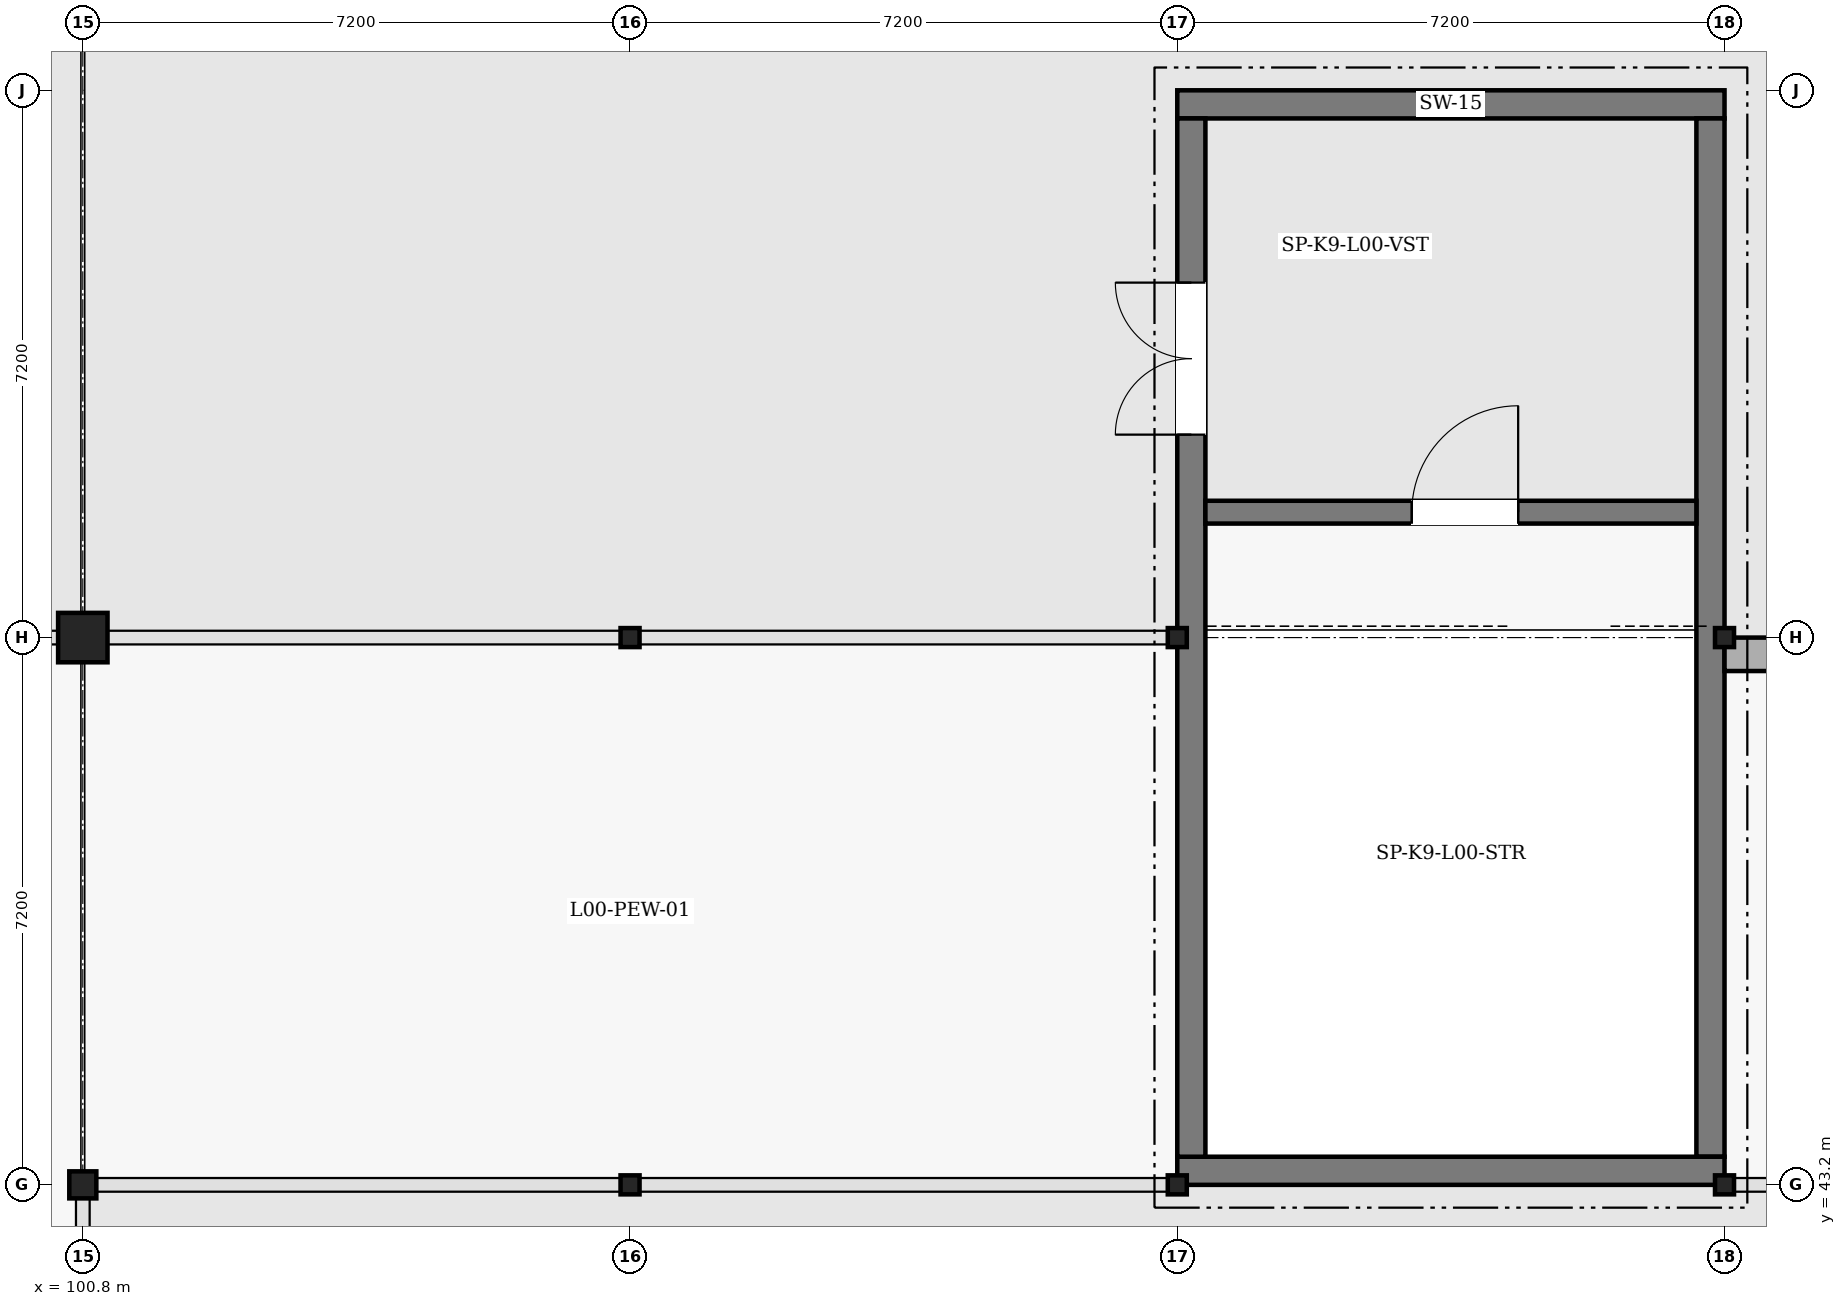
"""IFC4 building model, lengths in metres.
Left out: names, types, materials, properties, quantities, classifications, styles, units other than length and angle.
Written with IfcOpenShell. Run it as: python <this file> out.ifc"""

import sys

from ifc_helpers import new_model, si_unit, direction, frame, frame_2d, origin, origin_2d, place, context, subcontext, project, spatial, rectangle, hollow_rectangle, hollow_circle, extrude, element, fill, save


model = new_model("IFC4")
c1 = context("Model", 3, precision=1e-05, world=origin(), true_north=direction((0.0, 1.0)))
c2 = subcontext(c1, "Body", "Model", "MODEL_VIEW")
j1 = project(units=[si_unit("LENGTHUNIT", "METRE"), si_unit("PLANEANGLEUNIT", "RADIAN")], contexts=[c1])
p1 = place(None, origin())
s1 = spatial("IfcSite", under=j1, at=p1, CompositionType="ELEMENT")
p2 = place(p1, origin())
s2 = spatial("IfcBuilding", under=s1, at=p2, CompositionType="ELEMENT")
p3 = place(p2, origin())
s3 = spatial("IfcBuildingStorey", under=s2, at=p3, CompositionType="ELEMENT", Elevation=0.0)
p4 = place(p3, frame((115.2, 57.415, 0.0), z_axis=(0.0, 0.0, 1.0), x_axis=(1.0, 0.0, 0.0)))
e1 = element("IfcWall", 1, at=p4, inside=s3, PredefinedType="SHEAR", context=c2, shape_type="SweptSolid", body=[
    extrude(rectangle(XDim=7.2, YDim=0.37, at=frame_2d((3.6, 0.0))), origin(), (0.0, 0.0, 1.0), 5.4),
])
p5 = place(p3, frame((122.215, 57.23, 0.0), z_axis=(0.0, 0.0, 1.0), x_axis=(0.0, -1.0, 0.0)))
e2 = element("IfcWall", 2, at=p5, inside=s3, PredefinedType="SHEAR", context=c2, shape_type="SweptSolid", body=[
    extrude(rectangle(XDim=13.66, YDim=0.37, at=frame_2d((6.83, 0.0))), origin(), (0.0, 0.0, 1.0), 5.4),
])
p6 = place(p3, frame((122.4, 43.385, 0.0), z_axis=(0.0, 0.0, 1.0), x_axis=(-1.0, 0.0, 0.0)))
e3 = element("IfcWall", 3, at=p6, inside=s3, PredefinedType="SHEAR", context=c2, shape_type="SweptSolid", body=[
    extrude(rectangle(XDim=7.2, YDim=0.37, at=frame_2d((3.6, 0.0))), origin(), (0.0, 0.0, 1.0), 5.4),
])
p7 = place(p3, frame((115.385, 43.57, 0.0), z_axis=(0.0, 0.0, 1.0), x_axis=(0.0, 1.0, 0.0)))
e4 = element("IfcWall", 4, at=p7, inside=s3, PredefinedType="SHEAR", context=c2, shape_type="SweptSolid", body=[
    extrude(rectangle(XDim=13.66, YDim=0.37, at=frame_2d((6.83, 0.0))), origin(), (0.0, 0.0, 1.0), 5.4),
])
p8 = place(p7, frame((9.5, 0.0, 0.0)))
e5 = element("IfcOpeningElement", 5, at=p8, cuts=e4, PredefinedType="OPENING", context=c2, shape_type="SweptSolid", body=[
    extrude(rectangle(XDim=2.0, YDim=2.3, at=frame_2d((1.0, 1.15))), frame((0.0, 0.195, 0.0), z_axis=(0.0, -1.0, 0.0), x_axis=(1.0, 0.0, 0.0)), (0.0, 0.0, 1.0), 0.39),
])
p9 = place(p3, frame((115.57, 52.05, 0.0), z_axis=(0.0, 0.0, 1.0), x_axis=(1.0, 0.0, 0.0)))
e6 = element("IfcWall", 6, at=p9, inside=s3, PredefinedType="SHEAR", context=c2, shape_type="SweptSolid", body=[
    extrude(rectangle(XDim=6.46, YDim=0.3, at=frame_2d((3.23, 0.0))), origin(), (0.0, 0.0, 1.0), 5.4),
])
p10 = place(p9, frame((2.715, 0.0, 0.0)))
e7 = element("IfcOpeningElement", 7, at=p10, cuts=e6, PredefinedType="OPENING", context=c2, shape_type="SweptSolid", body=[
    extrude(rectangle(XDim=1.4, YDim=2.2, at=frame_2d((0.7, 1.1))), frame((0.0, 0.16, 0.0), z_axis=(0.0, -1.0, 0.0), x_axis=(1.0, 0.0, 0.0)), (0.0, 0.0, 1.0), 0.32),
])
p11 = place(p3, frame((100.8, 43.2, 0.0), z_axis=(0.0, 0.0, 1.0), x_axis=(1.0, 0.0, 0.0)))
e8 = element("IfcColumn", 8, at=p11, inside=s3, PredefinedType="COLUMN", context=c2, shape_type="SweptSolid", body=[
    extrude(hollow_circle(Radius=0.178, WallThickness=0.016, at=origin_2d()), origin(), (0.0, 0.0, 1.0), 5.1),
])
p12 = place(p3, frame((100.8, 50.4, 0.0), z_axis=(0.0, 0.0, 1.0), x_axis=(1.0, 0.0, 0.0)))
e9 = element("IfcColumn", 9, at=p12, inside=s3, PredefinedType="COLUMN", context=c2, shape_type="SweptSolid", body=[
    extrude(rectangle(XDim=0.65, YDim=0.65, at=origin_2d()), origin(), (0.0, 0.0, 1.0), 5.4),
])
for number, where, z_axis, x_axis in (
    (10, (108.0, 43.2, 0.0), (0.0, 0.0, 1.0), (1.0, 0.0, 0.0)),
    (11, (108.0, 50.4, 0.0), (0.0, 0.0, 1.0), (1.0, 0.0, 0.0)),
    (12, (115.2, 43.2, 0.0), (0.0, 0.0, 1.0), (1.0, 0.0, 0.0)),
    (13, (115.2, 50.4, 0.0), (0.0, 0.0, 1.0), (1.0, 0.0, 0.0)),
    (14, (122.4, 43.2, 0.0), (0.0, 0.0, 1.0), (1.0, 0.0, 0.0)),
    (15, (122.4, 50.4, 0.0), (0.0, 0.0, 1.0), (1.0, 0.0, 0.0)),
):
    element("IfcColumn", number, at=place(p3, frame(where, z_axis=z_axis, x_axis=x_axis)), inside=s3, PredefinedType="COLUMN", context=c2, shape_type="SweptSolid", body=[
        extrude(hollow_rectangle(XDim=0.25, YDim=0.25, WallThickness=0.012, at=origin_2d()), origin(), (0.0, 0.0, 1.0), 5.16),
    ])
p13 = place(p3, frame((122.4, 50.18, 0.0), z_axis=(0.0, 0.0, 1.0), x_axis=(1.0, 0.0, 0.0)))
e16 = element("IfcWall", 16, at=p13, inside=s3, PredefinedType="SOLIDWALL", context=c2, shape_type="SweptSolid", body=[
    extrude(rectangle(XDim=7.315, YDim=0.44, at=frame_2d((3.658, 0.0))), origin(), (0.0, 0.0, 1.0), 5.1),
])
p14 = place(p13, frame((2.5, 0.0, 0.0)))
e17 = element("IfcOpeningElement", 17, at=p14, cuts=e16, PredefinedType="OPENING", context=c2, shape_type="SweptSolid", body=[
    extrude(rectangle(XDim=2.2, YDim=2.4, at=frame_2d((1.1, 1.2))), frame((0.0, 0.23, 0.0), z_axis=(0.0, -1.0, 0.0), x_axis=(1.0, 0.0, 0.0)), (0.0, 0.0, 1.0), 0.46),
])
p15 = place(p8, origin())
e18 = element("IfcDoor", 18, at=p15, inside=s3, OperationType="DOUBLE_DOOR_SINGLE_SWING", PredefinedType="DOOR", context=c2, shape_type="SweptSolid", body=[
    extrude(rectangle(XDim=2.0, YDim=2.3, at=frame_2d((1.0, 1.15))), frame((0.0, 0.025, 0.0), z_axis=(0.0, -1.0, 0.0), x_axis=(1.0, 0.0, 0.0)), (0.0, 0.0, 1.0), 0.05),
])
fill(e5, e18)
p16 = place(p10, origin())
e19 = element("IfcDoor", 19, at=p16, inside=s3, OperationType="SINGLE_SWING_RIGHT", PredefinedType="DOOR", context=c2, shape_type="SweptSolid", body=[
    extrude(rectangle(XDim=1.4, YDim=2.2, at=frame_2d((0.7, 1.1))), frame((0.0, 0.025, 0.0), z_axis=(0.0, -1.0, 0.0), x_axis=(1.0, 0.0, 0.0)), (0.0, 0.0, 1.0), 0.05),
])
fill(e7, e19)
save(model, sys.argv[1])
